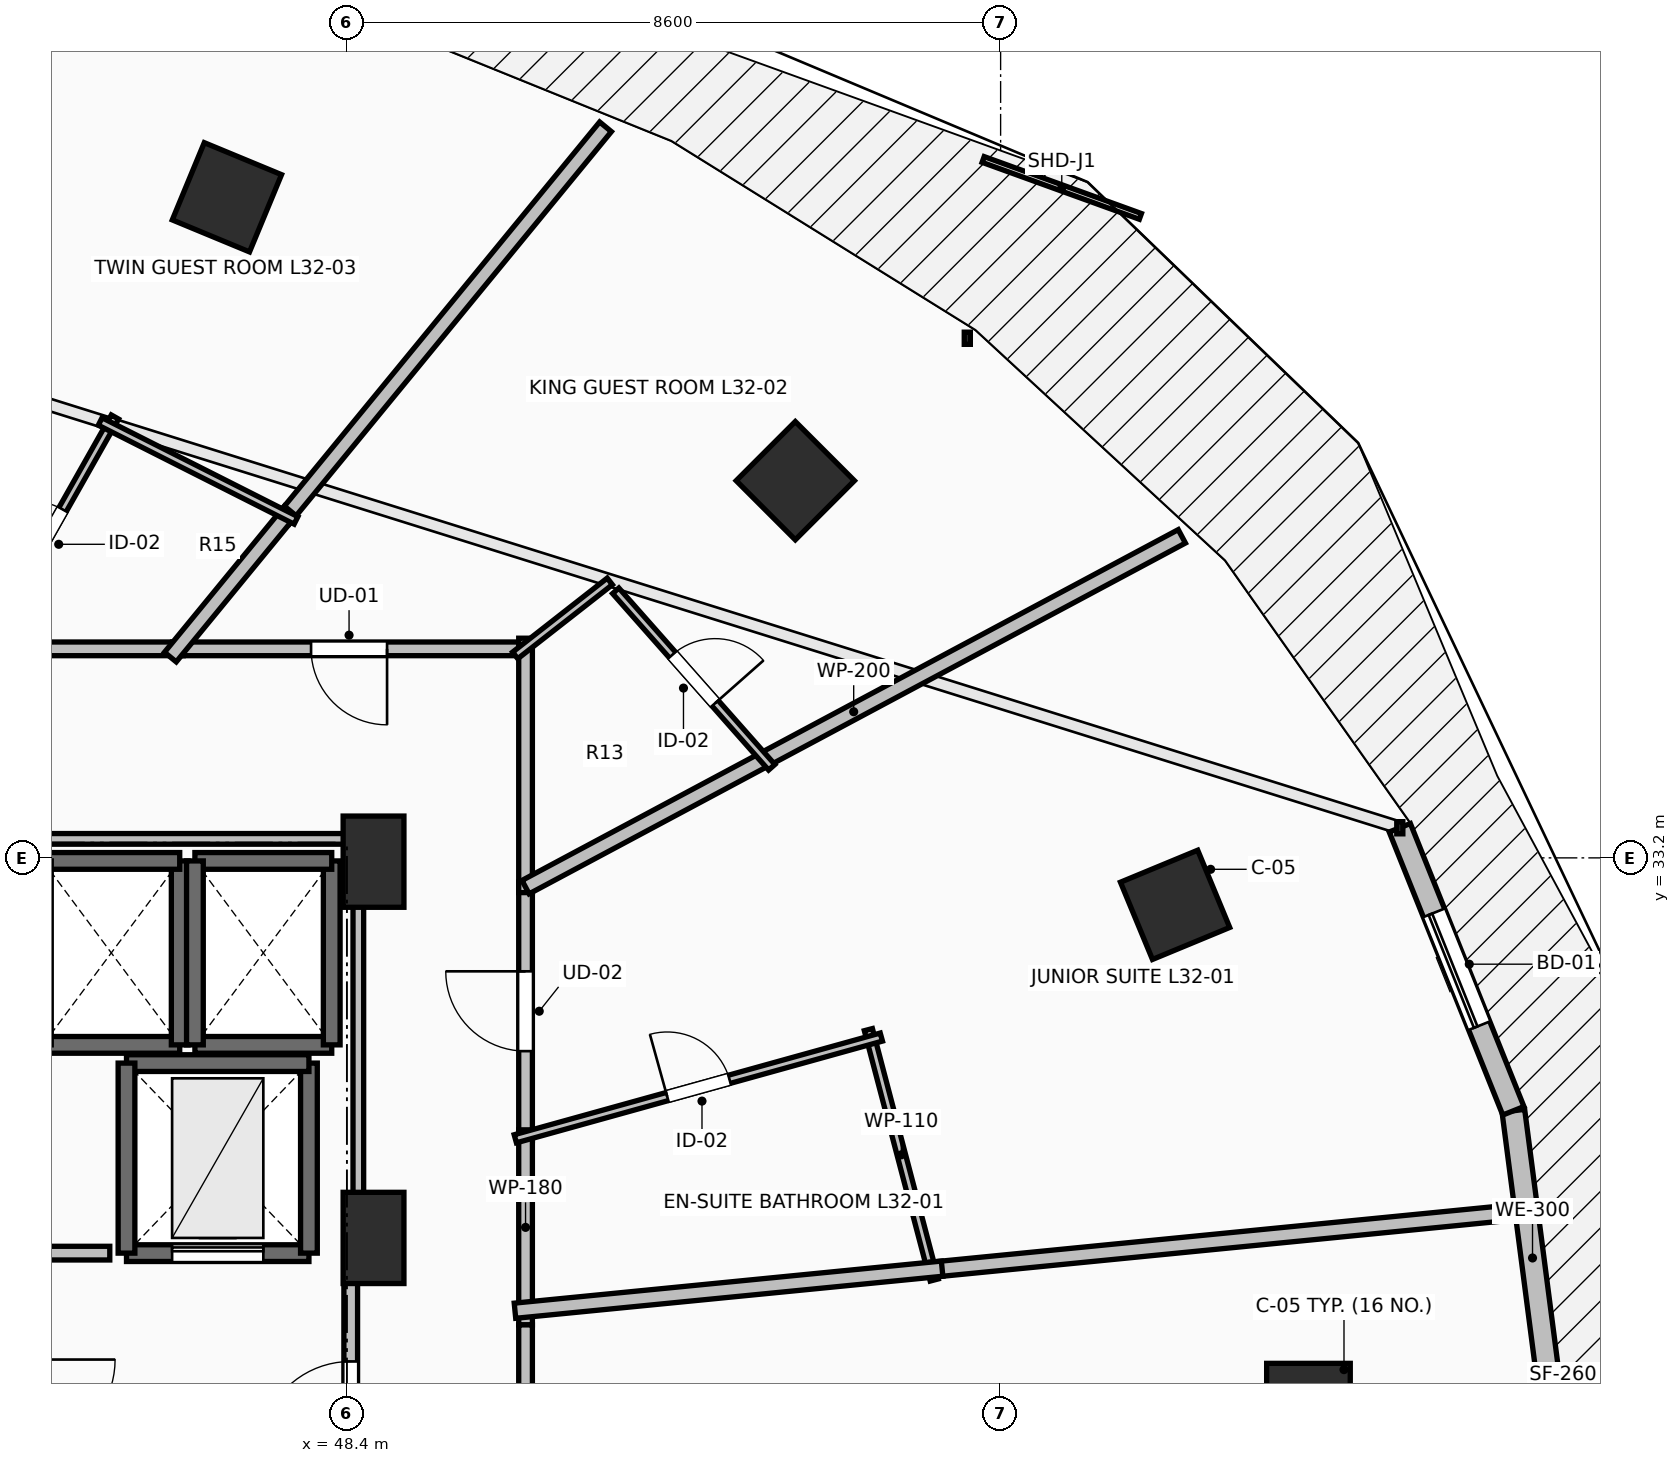
"""IFC4 building model, lengths in metres.
Left out: names, types, materials, properties, quantities, classifications, styles, units other than length and angle.
Written with IfcOpenShell. Run it as: python <this file> out.ifc"""

import sys

from ifc_helpers import new_model, si_unit, direction, frame, frame_2d, origin, origin_2d, place, context, subcontext, project, spatial, rectangle, extrude, element, fill, save


model = new_model("IFC4")
c1 = context("Model", 3, precision=1e-05, world=origin(), true_north=direction((0.0, 1.0)))
c2 = subcontext(c1, "Body", "Model", "MODEL_VIEW")
j1 = project(units=[si_unit("LENGTHUNIT", "METRE"), si_unit("PLANEANGLEUNIT", "RADIAN")], contexts=[c1])
p1 = place(None, origin())
s1 = spatial("IfcSite", under=j1, at=p1, CompositionType="ELEMENT")
p2 = place(p1, origin())
s2 = spatial("IfcBuilding", under=s1, at=p2, CompositionType="ELEMENT")
p3 = place(p2, frame((0.0, 0.0, 120.8)))
s3 = spatial("IfcBuildingStorey", under=s2, at=p3, CompositionType="ELEMENT", Elevation=120.8)
for number, where, z_axis, x_axis in (
    (1, (61.05, 26.0, 0.0), (0.0, 0.0, 1.0), (1.0, 0.0, 0.0)),
    (2, (59.295, 32.582, 0.0), (0.0, 0.0, 1.0), (0.924, 0.383, 0.0)),
    (3, (54.299, 38.162, 0.0), (0.0, 0.0, 1.0), (0.707, 0.707, 0.0)),
    (4, (46.821, 41.891, 0.0), (0.0, 0.0, 1.0), (0.383, 0.924, 0.0)),
):
    element("IfcColumn", number, at=place(p3, frame(where, z_axis=z_axis, x_axis=x_axis)), inside=s3, PredefinedType="COLUMN", context=c2, shape_type="SweptSolid", body=[
        extrude(rectangle(XDim=1.1, YDim=1.1, at=origin_2d()), origin(), (0.0, 0.0, 1.0), 3.5),
    ])
for number, where, z_axis, x_axis in (
    (5, (48.75, 33.15, 0.0), (0.0, 0.0, 1.0), (1.0, 0.0, 0.0)),
    (6, (48.75, 28.2, 0.0), (0.0, 0.0, 1.0), (1.0, 0.0, 0.0)),
):
    element("IfcColumn", number, at=place(p3, frame(where, z_axis=z_axis, x_axis=x_axis)), inside=s3, PredefinedType="PILASTER", context=c2, shape_type="SweptSolid", body=[
        extrude(rectangle(XDim=0.8, YDim=1.2, at=origin_2d()), origin(), (0.0, 0.0, 1.0), 3.5),
    ])
p4 = place(p3, frame((64.25, 26.0, 0.0), z_axis=(0.0, 0.0, 1.0), x_axis=(-0.129157444793, 0.991624099372, 0.0)))
e7 = element("IfcWall", 7, at=p4, inside=s3, PredefinedType="STANDARD", context=c2, shape_type="SweptSolid", body=[
    extrude(rectangle(XDim=3.905, YDim=0.3, at=frame_2d((1.953, 0.0))), origin(), (0.0, 0.0, 1.0), 3.15),
])
p5 = place(p3, frame((63.746, 29.873, 0.0), z_axis=(0.0, 0.0, 1.0), x_axis=(-0.372345205928, 0.92809430966, 0.0)))
e8 = element("IfcWall", 8, at=p5, inside=s3, PredefinedType="STANDARD", context=c2, shape_type="SweptSolid", body=[
    extrude(rectangle(XDim=4.012, YDim=0.3, at=frame_2d((2.006, 0.0))), origin(), (0.0, 0.0, 1.0), 3.15),
])
p6 = place(p5, frame((1.206, 0.0, 0.0)))
e9 = element("IfcOpeningElement", 9, at=p6, cuts=e8, PredefinedType="OPENING", context=c2, shape_type="SweptSolid", body=[
    extrude(rectangle(XDim=1.6, YDim=2.3, at=frame_2d((0.8, 1.15))), frame((0.0, 0.165, 0.0), z_axis=(0.0, -1.0, 0.0), x_axis=(1.0, 0.0, 0.0)), (0.0, 0.0, 1.0), 0.33),
])
p7 = place(p3, frame((44.4, 30.74, 0.0), z_axis=(0.0, 0.0, 1.0), x_axis=(1.0, 0.0, 0.0)))
e10 = element("IfcWall", 10, at=p7, inside=s3, PredefinedType="SOLIDWALL", context=c2, shape_type="SweptSolid", body=[
    extrude(rectangle(XDim=1.8, YDim=0.22, at=frame_2d((0.9, 0.0))), origin(), (0.0, 0.0, 1.0), 3.15),
])
p8 = place(p3, frame((46.2, 30.74, 0.0), z_axis=(0.0, 0.0, 1.0), x_axis=(0.0, 1.0, 0.0)))
e11 = element("IfcWall", 11, at=p8, inside=s3, PredefinedType="SOLIDWALL", context=c2, shape_type="SweptSolid", body=[
    extrude(rectangle(XDim=2.42, YDim=0.22, at=frame_2d((1.21, 0.0))), origin(), (0.0, 0.0, 1.0), 3.15),
])
for number, where, z_axis, x_axis in (
    (12, (46.2, 33.16, 0.0), (0.0, 0.0, 1.0), (-1.0, 0.0, 0.0)),
    (13, (46.4, 30.74, 0.0), (0.0, 0.0, 1.0), (1.0, 0.0, 0.0)),
):
    element("IfcWall", number, at=place(p3, frame(where, z_axis=z_axis, x_axis=x_axis)), inside=s3, PredefinedType="SOLIDWALL", context=c2, shape_type="SweptSolid", body=[
        extrude(rectangle(XDim=1.8, YDim=0.22, at=frame_2d((0.9, 0.0))), origin(), (0.0, 0.0, 1.0), 3.15),
    ])
p9 = place(p3, frame((48.2, 30.74, 0.0), z_axis=(0.0, 0.0, 1.0), x_axis=(0.0, 1.0, 0.0)))
e14 = element("IfcWall", 14, at=p9, inside=s3, PredefinedType="SOLIDWALL", context=c2, shape_type="SweptSolid", body=[
    extrude(rectangle(XDim=2.42, YDim=0.22, at=frame_2d((1.21, 0.0))), origin(), (0.0, 0.0, 1.0), 3.15),
])
p10 = place(p3, frame((48.2, 33.16, 0.0), z_axis=(0.0, 0.0, 1.0), x_axis=(-1.0, 0.0, 0.0)))
e15 = element("IfcWall", 15, at=p10, inside=s3, PredefinedType="SOLIDWALL", context=c2, shape_type="SweptSolid", body=[
    extrude(rectangle(XDim=1.8, YDim=0.22, at=frame_2d((0.9, 0.0))), origin(), (0.0, 0.0, 1.0), 3.15),
])
p11 = place(p3, frame((46.4, 33.16, 0.0), z_axis=(0.0, 0.0, 1.0), x_axis=(0.0, -1.0, 0.0)))
e16 = element("IfcWall", 16, at=p11, inside=s3, PredefinedType="SOLIDWALL", context=c2, shape_type="SweptSolid", body=[
    extrude(rectangle(XDim=2.42, YDim=0.22, at=frame_2d((1.21, 0.0))), origin(), (0.0, 0.0, 1.0), 3.15),
])
p12 = place(p3, frame((45.5, 28.0, 0.0), z_axis=(0.0, 0.0, 1.0), x_axis=(1.0, 0.0, 0.0)))
e17 = element("IfcWall", 17, at=p12, inside=s3, PredefinedType="SHEAR", context=c2, shape_type="SweptSolid", body=[
    extrude(rectangle(XDim=2.4, YDim=0.22, at=frame_2d((1.2, 0.0))), origin(), (0.0, 0.0, 1.0), 3.15),
])
p13 = place(p12, frame((0.6, 0.0, 0.0)))
e18 = element("IfcOpeningElement", 18, at=p13, cuts=e17, PredefinedType="OPENING", context=c2, shape_type="SweptSolid", body=[
    extrude(rectangle(XDim=1.2, YDim=2.2, at=frame_2d((0.6, 1.1))), frame((0.0, 0.125, 0.0), z_axis=(0.0, -1.0, 0.0), x_axis=(1.0, 0.0, 0.0)), (0.0, 0.0, 1.0), 0.25),
])
p14 = place(p3, frame((47.9, 28.0, 0.0), z_axis=(0.0, 0.0, 1.0), x_axis=(0.0, 1.0, 0.0)))
e19 = element("IfcWall", 19, at=p14, inside=s3, PredefinedType="SHEAR", context=c2, shape_type="SweptSolid", body=[
    extrude(rectangle(XDim=2.5, YDim=0.22, at=frame_2d((1.25, 0.0))), origin(), (0.0, 0.0, 1.0), 3.15),
])
p15 = place(p3, frame((47.9, 30.5, 0.0), z_axis=(0.0, 0.0, 1.0), x_axis=(-1.0, 0.0, 0.0)))
e20 = element("IfcWall", 20, at=p15, inside=s3, PredefinedType="SHEAR", context=c2, shape_type="SweptSolid", body=[
    extrude(rectangle(XDim=2.4, YDim=0.22, at=frame_2d((1.2, 0.0))), origin(), (0.0, 0.0, 1.0), 3.15),
])
p16 = place(p3, frame((45.5, 30.5, 0.0), z_axis=(0.0, 0.0, 1.0), x_axis=(0.0, -1.0, 0.0)))
e21 = element("IfcWall", 21, at=p16, inside=s3, PredefinedType="SHEAR", context=c2, shape_type="SweptSolid", body=[
    extrude(rectangle(XDim=2.5, YDim=0.22, at=frame_2d((1.25, 0.0))), origin(), (0.0, 0.0, 1.0), 3.15),
])
p17 = place(p3, frame((48.45, 23.95, 0.0), z_axis=(0.0, 0.0, 1.0), x_axis=(0.0, 1.0, 0.0)))
e22 = element("IfcWall", 22, at=p17, inside=s3, PredefinedType="PARTITIONING", context=c2, shape_type="SweptSolid", body=[
    extrude(rectangle(XDim=4.05, YDim=0.18, at=frame_2d((2.025, 0.0))), origin(), (0.0, 0.0, 1.0), 3.15),
])
p18 = place(p17, frame((1.425, 0.0, 0.0)))
e23 = element("IfcOpeningElement", 23, at=p18, cuts=e22, PredefinedType="OPENING", context=c2, shape_type="SweptSolid", body=[
    extrude(rectangle(XDim=1.2, YDim=2.15, at=frame_2d((0.6, 1.075))), frame((0.0, 0.105, 0.0), z_axis=(0.0, -1.0, 0.0), x_axis=(1.0, 0.0, 0.0)), (0.0, 0.0, 1.0), 0.21),
])
p19 = place(p3, frame((50.75, 29.482, 0.0), z_axis=(0.0, 0.0, 1.0), x_axis=(0.0, 1.0, 0.0)))
e24 = element("IfcWall", 24, at=p19, inside=s3, PredefinedType="PARTITIONING", context=c2, shape_type="SweptSolid", body=[
    extrude(rectangle(XDim=3.401, YDim=0.18, at=frame_2d((1.701, 0.0))), origin(), (0.0, 0.0, 1.0), 2.342),
])
p20 = place(p19, frame((1.176, 0.0, 0.0)))
e25 = element("IfcOpeningElement", 25, at=p20, cuts=e24, PredefinedType="OPENING", context=c2, shape_type="SweptSolid", body=[
    extrude(rectangle(XDim=1.05, YDim=2.2, at=frame_2d((0.525, 1.1))), frame((0.0, 0.105, 0.0), z_axis=(0.0, -1.0, 0.0), x_axis=(1.0, 0.0, 0.0)), (0.0, 0.0, 1.0), 0.21),
])
p21 = place(p3, frame((50.75, 27.056, 0.0), z_axis=(0.0, 0.0, 1.0), x_axis=(0.0, 1.0, 0.0)))
e26 = element("IfcWall", 26, at=p21, inside=s3, PredefinedType="PARTITIONING", context=c2, shape_type="SweptSolid", body=[
    extrude(rectangle(XDim=2.566, YDim=0.18, at=frame_2d((1.283, 0.0))), origin(), (0.0, 0.0, 1.0), 2.342),
])
p22 = place(p3, frame((50.75, 35.95, 0.0), z_axis=(0.0, 0.0, 1.0), x_axis=(-1.0, 0.0, 0.0)))
e27 = element("IfcWall", 27, at=p22, inside=s3, PredefinedType="PARTITIONING", context=c2, shape_type="SweptSolid", body=[
    extrude(rectangle(XDim=4.644, YDim=0.18, at=frame_2d((2.322, 0.0))), origin(), (0.0, 0.0, 1.0), 2.342),
])
p23 = place(p22, frame((1.822, 0.0, 0.0)))
e28 = element("IfcOpeningElement", 28, at=p23, cuts=e27, PredefinedType="OPENING", context=c2, shape_type="SweptSolid", body=[
    extrude(rectangle(XDim=1.0, YDim=2.15, at=frame_2d((0.5, 1.075))), frame((0.0, 0.105, 0.0), z_axis=(0.0, -1.0, 0.0), x_axis=(1.0, 0.0, 0.0)), (0.0, 0.0, 1.0), 0.21),
])
p24 = place(p3, frame((50.75, 32.743, 0.0), z_axis=(0.0, 0.0, 1.0), x_axis=(0.0, 1.0, 0.0)))
e29 = element("IfcWall", 29, at=p24, inside=s3, PredefinedType="PARTITIONING", context=c2, shape_type="SweptSolid", body=[
    extrude(rectangle(XDim=3.347, YDim=0.18, at=frame_2d((1.674, 0.0))), origin(), (0.0, 0.0, 1.0), 2.342),
])
p25 = place(p3, frame((46.246, 35.95, 0.0), z_axis=(0.0, 0.0, 1.0), x_axis=(-1.0, 0.0, 0.0)))
e30 = element("IfcWall", 30, at=p25, inside=s3, PredefinedType="PARTITIONING", context=c2, shape_type="SweptSolid", body=[
    extrude(rectangle(XDim=2.693, YDim=0.18, at=frame_2d((1.347, 0.0))), origin(), (0.0, 0.0, 1.0), 2.784),
])
p26 = place(p3, frame((50.75, 15.596, 0.0), z_axis=(0.0, 0.0, 1.0), x_axis=(0.0, 1.0, 0.0)))
e31 = element("IfcWall", 31, at=p26, inside=s3, PredefinedType="PARTITIONING", context=c2, shape_type="SweptSolid", body=[
    extrude(rectangle(XDim=11.46, YDim=0.18, at=frame_2d((5.73, 0.0))), origin(), (0.0, 0.0, 1.0), 2.342),
])
p27 = place(p26, frame((5.23, 0.0, 0.0)))
e32 = element("IfcOpeningElement", 32, at=p27, cuts=e31, PredefinedType="OPENING", context=c2, shape_type="SweptSolid", body=[
    extrude(rectangle(XDim=1.0, YDim=2.15, at=frame_2d((0.5, 1.075))), frame((0.0, 0.105, 0.0), z_axis=(0.0, -1.0, 0.0), x_axis=(1.0, 0.0, 0.0)), (0.0, 0.0, 1.0), 0.21),
])
p28 = place(p3, frame((55.26, 30.94, 0.0), z_axis=(0.0, 0.0, 1.0), x_axis=(0.254323935255, -0.967119090886, 0.0)))
e33 = element("IfcWall", 33, at=p28, inside=s3, PredefinedType="PARTITIONING", context=c2, shape_type="SweptSolid", body=[
    extrude(rectangle(XDim=3.406, YDim=0.11, at=frame_2d((1.703, 0.0))), origin(), (0.0, 0.0, 1.0), 2.839),
])
p29 = place(p3, frame((50.615, 29.504, 0.0), z_axis=(0.0, 0.0, 1.0), x_axis=(0.963498313434, 0.267714400078, 0.0)))
e34 = element("IfcWall", 34, at=p29, inside=s3, PredefinedType="PARTITIONING", context=c2, shape_type="SweptSolid", body=[
    extrude(rectangle(XDim=4.998, YDim=0.11, at=frame_2d((2.499, 0.0))), origin(), (0.0, 0.0, 1.0), 2.784),
])
p30 = place(p29, frame((2.074, 0.0, 0.0)))
e35 = element("IfcOpeningElement", 35, at=p30, cuts=e34, PredefinedType="OPENING", context=c2, shape_type="SweptSolid", body=[
    extrude(rectangle(XDim=0.85, YDim=2.1, at=frame_2d((0.425, 1.05))), frame((0.0, 0.07, 0.0), z_axis=(0.0, -1.0, 0.0), x_axis=(1.0, 0.0, 0.0)), (0.0, 0.0, 1.0), 0.14),
])
p31 = place(p3, frame((59.384, 37.43, 0.0), z_axis=(0.0, 0.0, 1.0), x_axis=(-0.881921122551, -0.471397002109, 0.0)))
e36 = element("IfcWall", 36, at=p31, inside=s3, PredefinedType="PARTITIONING", context=c2, shape_type="SweptSolid", body=[
    extrude(rectangle(XDim=9.79, YDim=0.2, at=frame_2d((4.895, 0.0))), origin(), (0.0, 0.0, 1.0), 2.342),
])
p32 = place(p3, frame((56.091, 27.782, 0.0), z_axis=(0.0, 0.0, 1.0), x_axis=(0.995182127762, 0.098043523927, 0.0)))
e37 = element("IfcWall", 37, at=p32, inside=s3, PredefinedType="PARTITIONING", context=c2, shape_type="SweptSolid", body=[
    extrude(rectangle(XDim=7.864, YDim=0.2, at=frame_2d((3.932, 0.0))), origin(), (0.0, 0.0, 1.0), 2.587),
])
p33 = place(p3, frame((50.611, 27.242, 0.0), z_axis=(0.0, 0.0, 1.0), x_axis=(0.995185043486, 0.098013923607, 0.0)))
e38 = element("IfcWall", 38, at=p33, inside=s3, PredefinedType="PARTITIONING", context=c2, shape_type="SweptSolid", body=[
    extrude(rectangle(XDim=5.647, YDim=0.2, at=frame_2d((2.823, 0.0))), origin(), (0.0, 0.0, 1.0), 2.342),
])
p34 = place(p3, frame((51.936, 36.714, 0.0), z_axis=(0.0, 0.0, 1.0), x_axis=(0.662322264705, -0.749219071885, 0.0)))
e39 = element("IfcWall", 39, at=p34, inside=s3, PredefinedType="PARTITIONING", context=c2, shape_type="SweptSolid", body=[
    extrude(rectangle(XDim=3.099, YDim=0.11, at=frame_2d((1.549, 0.0))), origin(), (0.0, 0.0, 1.0), 2.342),
])
p35 = place(p34, frame((1.125, 0.0, 0.0)))
e40 = element("IfcOpeningElement", 40, at=p35, cuts=e39, PredefinedType="OPENING", context=c2, shape_type="SweptSolid", body=[
    extrude(rectangle(XDim=0.85, YDim=2.1, at=frame_2d((0.425, 1.05))), frame((0.0, 0.07, 0.0), z_axis=(0.0, -1.0, 0.0), x_axis=(1.0, 0.0, 0.0)), (0.0, 0.0, 1.0), 0.14),
])
p36 = place(p3, frame((50.614, 35.864, 0.0), z_axis=(0.0, 0.0, 1.0), x_axis=(0.787635392766, 0.616141613643, 0.0)))
e41 = element("IfcWall", 41, at=p36, inside=s3, PredefinedType="PARTITIONING", context=c2, shape_type="SweptSolid", body=[
    extrude(rectangle(XDim=1.58, YDim=0.11, at=frame_2d((0.79, 0.0))), origin(), (0.0, 0.0, 1.0), 2.839),
])
p37 = place(p3, frame((51.802, 42.818, 0.0), z_axis=(0.0, 0.0, 1.0), x_axis=(-0.634361991629, -0.773036133422, 0.0)))
e42 = element("IfcWall", 42, at=p37, inside=s3, PredefinedType="PARTITIONING", context=c2, shape_type="SweptSolid", body=[
    extrude(rectangle(XDim=6.678, YDim=0.2, at=frame_2d((3.339, 0.0))), origin(), (0.0, 0.0, 1.0), 2.342),
])
p38 = place(p3, frame((47.655, 37.764, 0.0), z_axis=(0.0, 0.0, 1.0), x_axis=(-0.634343688691, -0.773051152653, 0.0)))
e43 = element("IfcWall", 43, at=p38, inside=s3, PredefinedType="PARTITIONING", context=c2, shape_type="SweptSolid", body=[
    extrude(rectangle(XDim=2.487, YDim=0.2, at=frame_2d((1.244, 0.0))), origin(), (0.0, 0.0, 1.0), 2.342),
])
p39 = place(p3, frame((43.555, 35.828, 0.0), z_axis=(0.0, 0.0, 1.0), x_axis=(0.492041800526, 0.870571574619, 0.0)))
e44 = element("IfcWall", 44, at=p39, inside=s3, PredefinedType="PARTITIONING", context=c2, shape_type="SweptSolid", body=[
    extrude(rectangle(XDim=3.644, YDim=0.11, at=frame_2d((1.822, 0.0))), origin(), (0.0, 0.0, 1.0), 2.784),
])
p40 = place(p39, frame((1.397, 0.0, 0.0)))
e45 = element("IfcOpeningElement", 45, at=p40, cuts=e44, PredefinedType="OPENING", context=c2, shape_type="SweptSolid", body=[
    extrude(rectangle(XDim=0.85, YDim=2.1, at=frame_2d((0.425, 1.05))), frame((0.0, 0.07, 0.0), z_axis=(0.0, -1.0, 0.0), x_axis=(1.0, 0.0, 0.0)), (0.0, 0.0, 1.0), 0.14),
])
p41 = place(p3, frame((45.154, 38.941, 0.0), z_axis=(0.0, 0.0, 1.0), x_axis=(0.892575386964, -0.450898190932, 0.0)))
e46 = element("IfcWall", 46, at=p41, inside=s3, PredefinedType="PARTITIONING", context=c2, shape_type="SweptSolid", body=[
    extrude(rectangle(XDim=2.886, YDim=0.11, at=frame_2d((1.443, 0.0))), origin(), (0.0, 0.0, 1.0), 2.342),
])
p42 = place(p3, frame((45.28, 28.0, 0.0), z_axis=(0.0, 0.0, 1.0), x_axis=(-1.0, 0.0, 0.0)))
e47 = element("IfcWall", 47, at=p42, inside=s3, PredefinedType="PARTITIONING", context=c2, shape_type="SweptSolid", body=[
    extrude(rectangle(XDim=0.915, YDim=0.18, at=frame_2d((0.458, 0.0))), origin(), (0.0, 0.0, 1.0), 3.15),
])
p43 = place(p3, frame((44.34, 33.45, 0.0), z_axis=(0.0, 0.0, 1.0), x_axis=(1.0, 0.0, 0.0)))
e48 = element("IfcWall", 48, at=p43, inside=s3, PredefinedType="PARTITIONING", context=c2, shape_type="SweptSolid", body=[
    extrude(rectangle(XDim=4.21, YDim=0.14, at=frame_2d((2.105, 0.0))), origin(), (0.0, 0.0, 1.0), 2.342),
])
p44 = place(p3, frame((48.55, 33.45, 0.0), z_axis=(0.0, 0.0, 1.0), x_axis=(0.0, -1.0, 0.0)))
e49 = element("IfcWall", 49, at=p44, inside=s3, PredefinedType="PARTITIONING", context=c2, shape_type="SweptSolid", body=[
    extrude(rectangle(XDim=5.254, YDim=0.14, at=frame_2d((2.627, 0.0))), origin(), (0.0, 0.0, 1.0), 2.342),
])
p45 = place(p6, origin())
e50 = element("IfcDoor", 50, at=p45, inside=s3, OperationType="SLIDING_TO_LEFT", PredefinedType="DOOR", context=c2, shape_type="SweptSolid", body=[
    extrude(rectangle(XDim=1.6, YDim=2.3, at=frame_2d((0.8, 1.15))), frame((0.0, 0.025, 0.0), z_axis=(0.0, -1.0, 0.0), x_axis=(1.0, 0.0, 0.0)), (0.0, 0.0, 1.0), 0.05),
])
fill(e9, e50)
p46 = place(p13, origin())
e51 = element("IfcDoor", 51, at=p46, inside=s3, OperationType="SLIDING_TO_LEFT", PredefinedType="DOOR", context=c2, shape_type="SweptSolid", body=[
    extrude(rectangle(XDim=1.2, YDim=2.2, at=frame_2d((0.6, 1.1))), frame((0.0, 0.025, 0.0), z_axis=(0.0, -1.0, 0.0), x_axis=(1.0, 0.0, 0.0)), (0.0, 0.0, 1.0), 0.05),
])
fill(e18, e51)
p47 = place(p18, origin())
e52 = element("IfcDoor", 52, at=p47, inside=s3, OperationType="SINGLE_SWING_LEFT", PredefinedType="DOOR", context=c2, shape_type="SweptSolid", body=[
    extrude(rectangle(XDim=1.2, YDim=2.15, at=frame_2d((0.6, 1.075))), frame((0.0, 0.025, 0.0), z_axis=(0.0, -1.0, 0.0), x_axis=(1.0, 0.0, 0.0)), (0.0, 0.0, 1.0), 0.05),
])
fill(e23, e52)
p48 = place(p20, origin())
e53 = element("IfcDoor", 53, at=p48, inside=s3, OperationType="SINGLE_SWING_RIGHT", PredefinedType="DOOR", context=c2, shape_type="SweptSolid", body=[
    extrude(rectangle(XDim=1.05, YDim=2.2, at=frame_2d((0.525, 1.1))), frame((0.0, 0.025, 0.0), z_axis=(0.0, -1.0, 0.0), x_axis=(1.0, 0.0, 0.0)), (0.0, 0.0, 1.0), 0.05),
])
fill(e25, e53)
p49 = place(p23, origin())
e54 = element("IfcDoor", 54, at=p49, inside=s3, OperationType="SINGLE_SWING_LEFT", PredefinedType="DOOR", context=c2, shape_type="SweptSolid", body=[
    extrude(rectangle(XDim=1.0, YDim=2.15, at=frame_2d((0.5, 1.075))), frame((0.0, 0.025, 0.0), z_axis=(0.0, -1.0, 0.0), x_axis=(1.0, 0.0, 0.0)), (0.0, 0.0, 1.0), 0.05),
])
fill(e28, e54)
p50 = place(p30, origin())
e55 = element("IfcDoor", 55, at=p50, inside=s3, OperationType="SINGLE_SWING_LEFT", PredefinedType="DOOR", context=c2, shape_type="SweptSolid", body=[
    extrude(rectangle(XDim=0.85, YDim=2.1, at=frame_2d((0.425, 1.05))), frame((0.0, 0.025, 0.0), z_axis=(0.0, -1.0, 0.0), x_axis=(1.0, 0.0, 0.0)), (0.0, 0.0, 1.0), 0.05),
])
fill(e35, e55)
p51 = place(p35, origin())
e56 = element("IfcDoor", 56, at=p51, inside=s3, OperationType="SINGLE_SWING_RIGHT", PredefinedType="DOOR", context=c2, shape_type="SweptSolid", body=[
    extrude(rectangle(XDim=0.85, YDim=2.1, at=frame_2d((0.425, 1.05))), frame((0.0, 0.025, 0.0), z_axis=(0.0, -1.0, 0.0), x_axis=(1.0, 0.0, 0.0)), (0.0, 0.0, 1.0), 0.05),
])
fill(e40, e56)
p52 = place(p40, origin())
e57 = element("IfcDoor", 57, at=p52, inside=s3, OperationType="SINGLE_SWING_LEFT", PredefinedType="DOOR", context=c2, shape_type="SweptSolid", body=[
    extrude(rectangle(XDim=0.85, YDim=2.1, at=frame_2d((0.425, 1.05))), frame((0.0, 0.025, 0.0), z_axis=(0.0, -1.0, 0.0), x_axis=(1.0, 0.0, 0.0)), (0.0, 0.0, 1.0), 0.05),
])
fill(e45, e57)
save(model, sys.argv[1])
